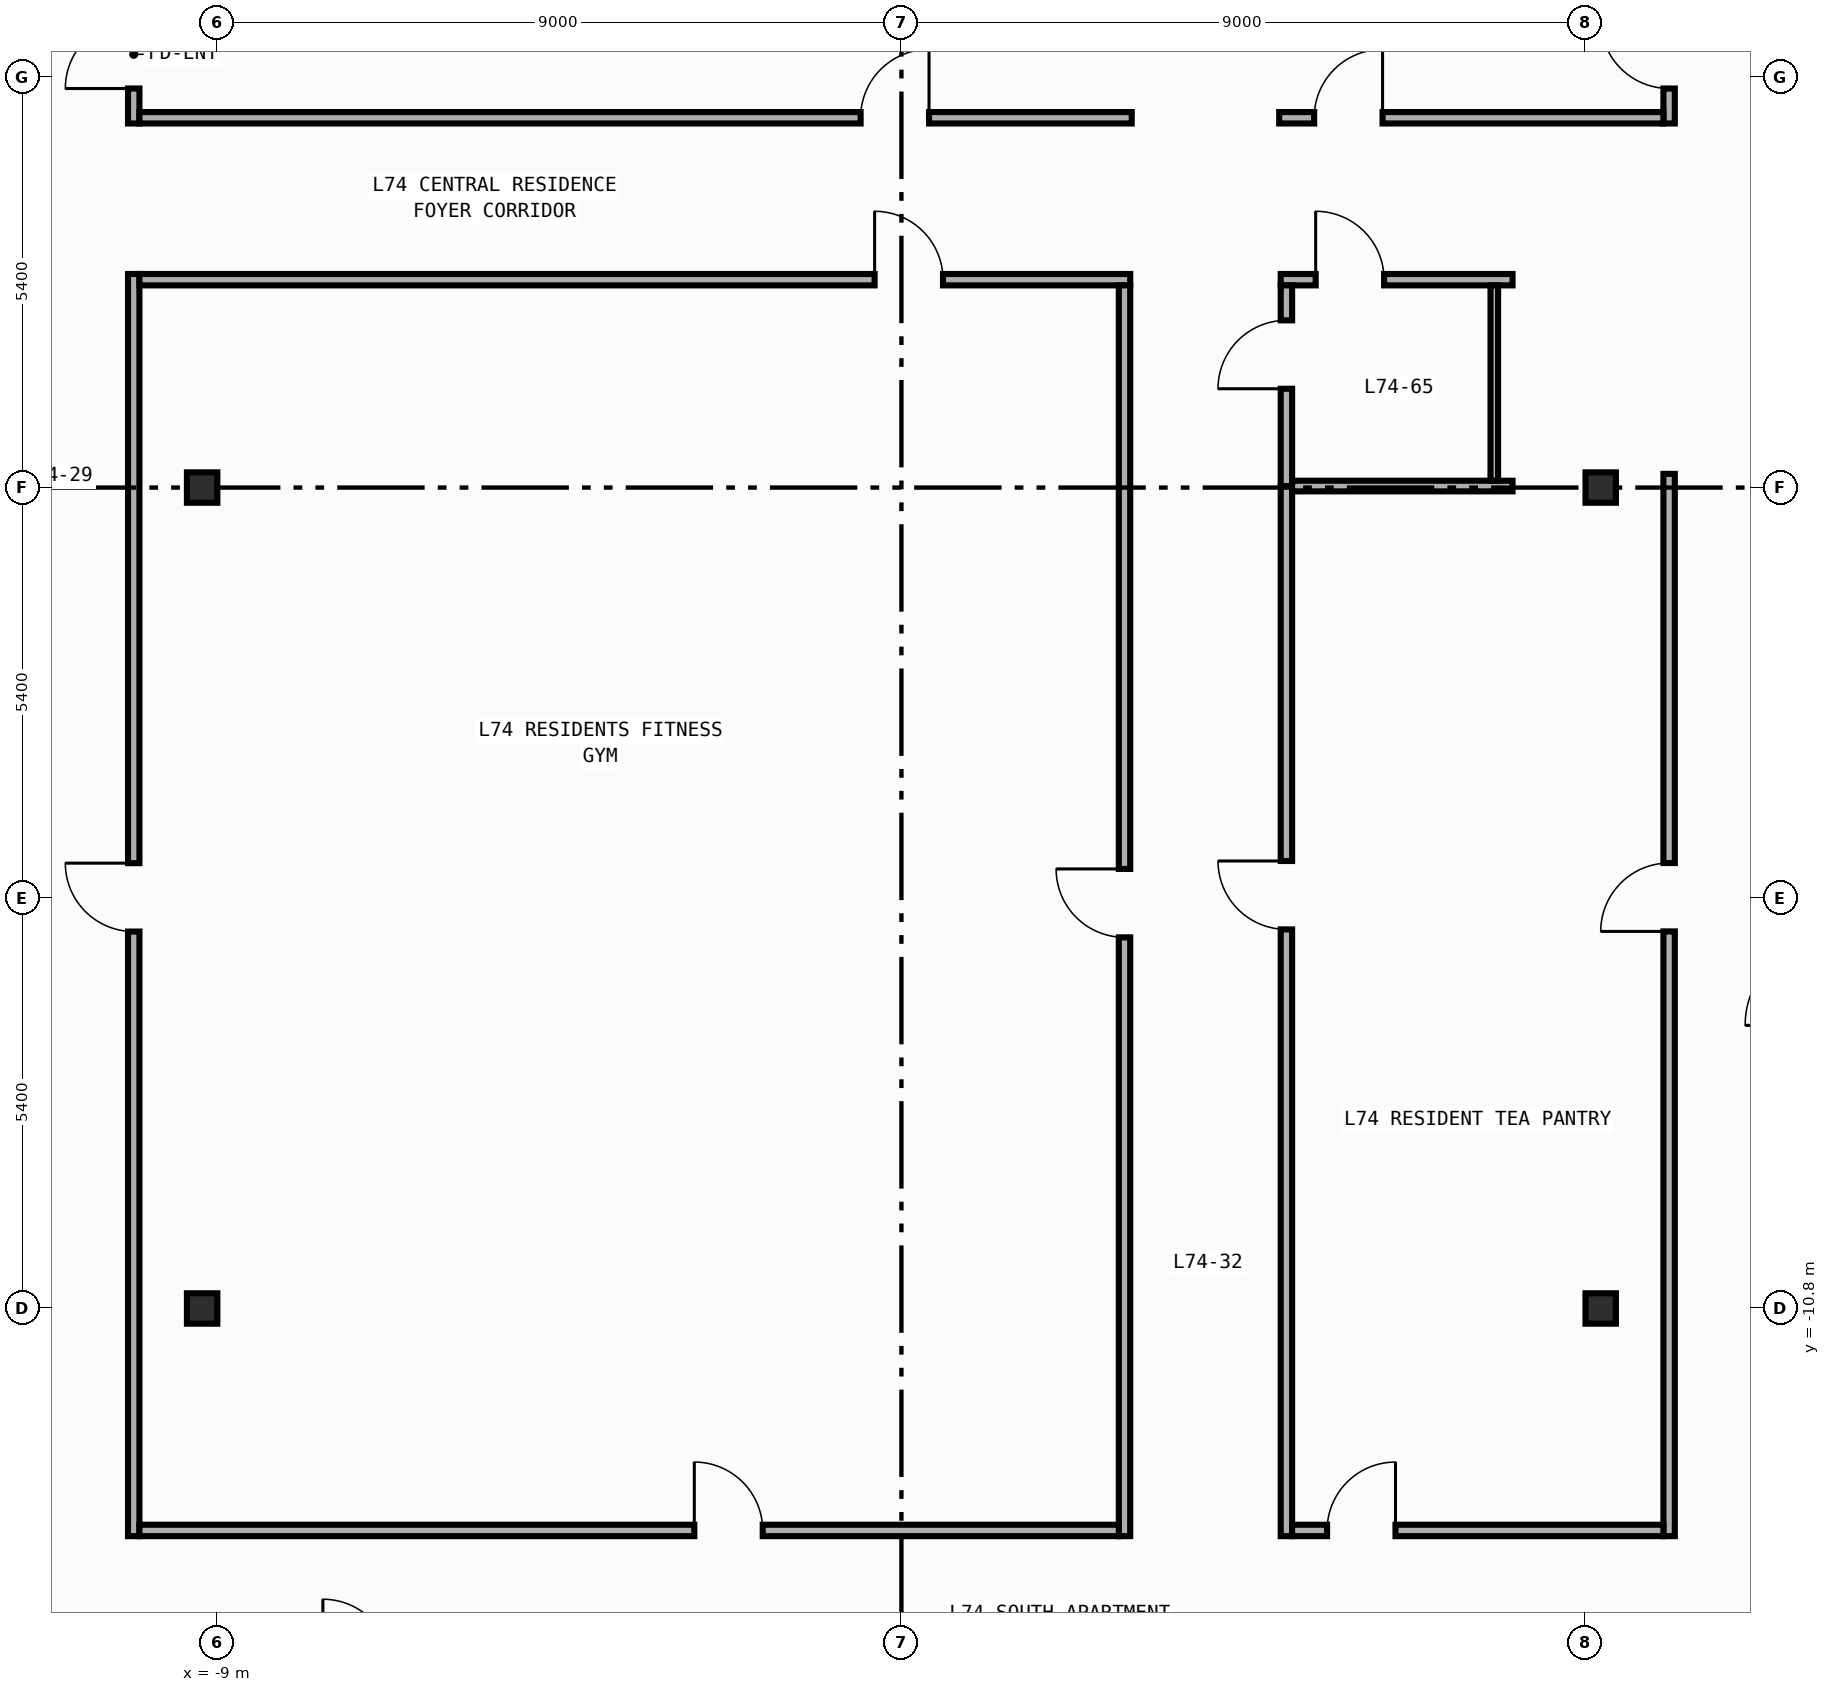
"""IFC4 building model, lengths in metres.
Left out: names, types, materials, properties, quantities, classifications, styles, units other than length and angle.
Written with IfcOpenShell. Run it as: python <this file> out.ifc"""

import sys

from ifc_helpers import new_model, si_unit, direction, frame, frame_2d, origin, origin_2d, place, context, subcontext, project, spatial, rectangle, i_section, extrude, element, fill, save


model = new_model("IFC4")
c1 = context("Model", 3, precision=1e-05, world=origin(), true_north=direction((0.0, 1.0)))
c2 = subcontext(c1, "Body", "Model", "MODEL_VIEW")
j1 = project(units=[si_unit("LENGTHUNIT", "METRE"), si_unit("PLANEANGLEUNIT", "RADIAN")], contexts=[c1])
p1 = place(None, origin())
s1 = spatial("IfcSite", under=j1, at=p1, CompositionType="ELEMENT")
p2 = place(p1, origin())
s2 = spatial("IfcBuilding", under=s1, at=p2, CompositionType="ELEMENT")
p3 = place(p2, frame((0.0, 0.0, 308.0)))
s3 = spatial("IfcBuildingStorey", under=s2, at=p3, CompositionType="ELEMENT", Elevation=308.0)
for number, where, z_axis, x_axis in (
    (1, (-9.2, -10.8, 0.0), (0.0, 0.0, 1.0), (1.0, 0.0, 0.0)),
    (2, (-9.2, 0.0, 0.0), (0.0, 0.0, 1.0), (1.0, 0.0, 0.0)),
    (3, (9.2, -10.8, 0.0), (0.0, 0.0, 1.0), (1.0, 0.0, 0.0)),
    (4, (9.2, 0.0, 0.0), (0.0, 0.0, 1.0), (1.0, 0.0, 0.0)),
):
    element("IfcColumn", number, at=place(p3, frame(where, z_axis=z_axis, x_axis=x_axis)), inside=s3, PredefinedType="COLUMN", context=c2, shape_type="SweptSolid", body=[
        extrude(i_section(OverallWidth=0.4, OverallDepth=0.4, WebThickness=0.013, FlangeThickness=0.021, FilletRadius=0.022, at=origin_2d()), origin(), (0.0, 0.0, 1.0), 3.8),
    ])
p4 = place(p3, frame((-10.1, 4.79, 0.0), z_axis=(0.0, 0.0, 1.0), x_axis=(0.0, 1.0, 0.0)))
e5 = element("IfcWall", 5, at=p4, inside=s3, PredefinedType="PARTITIONING", context=c2, shape_type="SweptSolid", body=[
    extrude(rectangle(XDim=9.005, YDim=0.15, at=frame_2d((4.502, 0.0))), origin(), (0.0, 0.0, 1.0), 3.54),
])
p5 = place(p4, frame((0.46, 0.0, 0.0)))
e6 = element("IfcOpeningElement", 6, at=p5, cuts=e5, PredefinedType="OPENING", context=c2, shape_type="SweptSolid", body=[
    extrude(rectangle(XDim=0.9, YDim=2.15, at=frame_2d((0.45, 1.075))), frame((0.0, 0.085, 0.0), z_axis=(0.0, -1.0, 0.0), x_axis=(1.0, 0.0, 0.0)), (0.0, 0.0, 1.0), 0.17),
])
p6 = place(p3, frame((-10.1, -13.795, 0.0), z_axis=(0.0, 0.0, 1.0), x_axis=(0.0, 1.0, 0.0)))
e7 = element("IfcWall", 7, at=p6, inside=s3, PredefinedType="PARTITIONING", context=c2, shape_type="SweptSolid", body=[
    extrude(rectangle(XDim=16.605, YDim=0.15, at=frame_2d((8.302, 0.0))), origin(), (0.0, 0.0, 1.0), 3.54),
])
p7 = place(p6, frame((7.954, 0.0, 0.0)))
e8 = element("IfcOpeningElement", 8, at=p7, cuts=e7, PredefinedType="OPENING", context=c2, shape_type="SweptSolid", body=[
    extrude(rectangle(XDim=0.9, YDim=2.15, at=frame_2d((0.45, 1.075))), frame((0.0, 0.085, 0.0), z_axis=(0.0, -1.0, 0.0), x_axis=(1.0, 0.0, 0.0)), (0.0, 0.0, 1.0), 0.17),
])
p8 = place(p3, frame((10.1, 4.79, 0.0), z_axis=(0.0, 0.0, 1.0), x_axis=(0.0, 1.0, 0.0)))
e9 = element("IfcWall", 9, at=p8, inside=s3, PredefinedType="PARTITIONING", context=c2, shape_type="SweptSolid", body=[
    extrude(rectangle(XDim=9.09, YDim=0.15, at=frame_2d((4.545, 0.0))), origin(), (0.0, 0.0, 1.0), 3.54),
])
p9 = place(p8, frame((0.46, 0.0, 0.0)))
e10 = element("IfcOpeningElement", 10, at=p9, cuts=e9, PredefinedType="OPENING", context=c2, shape_type="SweptSolid", body=[
    extrude(rectangle(XDim=0.9, YDim=2.15, at=frame_2d((0.45, 1.075))), frame((0.0, 0.085, 0.0), z_axis=(0.0, -1.0, 0.0), x_axis=(1.0, 0.0, 0.0)), (0.0, 0.0, 1.0), 0.17),
])
p10 = place(p3, frame((10.1, -13.795, 0.0), z_axis=(0.0, 0.0, 1.0), x_axis=(0.0, 1.0, 0.0)))
e11 = element("IfcWall", 11, at=p10, inside=s3, PredefinedType="PARTITIONING", context=c2, shape_type="SweptSolid", body=[
    extrude(rectangle(XDim=13.975, YDim=0.15, at=frame_2d((6.987, 0.0))), origin(), (0.0, 0.0, 1.0), 3.54),
])
p11 = place(p10, frame((7.956, 0.0, 0.0)))
e12 = element("IfcOpeningElement", 12, at=p11, cuts=e11, PredefinedType="OPENING", context=c2, shape_type="SweptSolid", body=[
    extrude(rectangle(XDim=0.9, YDim=2.15, at=frame_2d((0.45, 1.075))), frame((0.0, 0.085, 0.0), z_axis=(0.0, -1.0, 0.0), x_axis=(1.0, 0.0, 0.0)), (0.0, 0.0, 1.0), 0.17),
])
p12 = place(p3, frame((-10.025, 4.865, 0.0), z_axis=(0.0, 0.0, 1.0), x_axis=(1.0, 0.0, 0.0)))
e13 = element("IfcWall", 13, at=p12, inside=s3, PredefinedType="PARTITIONING", context=c2, shape_type="SweptSolid", body=[
    extrude(rectangle(XDim=13.055, YDim=0.15, at=frame_2d((6.527, 0.0))), origin(), (0.0, 0.0, 1.0), 3.54),
])
p13 = place(p12, frame((9.488, 0.0, 0.0)))
e14 = element("IfcOpeningElement", 14, at=p13, cuts=e13, PredefinedType="OPENING", context=c2, shape_type="SweptSolid", body=[
    extrude(rectangle(XDim=0.9, YDim=2.15, at=frame_2d((0.45, 1.075))), frame((0.0, 0.085, 0.0), z_axis=(0.0, -1.0, 0.0), x_axis=(1.0, 0.0, 0.0)), (0.0, 0.0, 1.0), 0.17),
])
p14 = place(p3, frame((-10.025, 2.735, 0.0), z_axis=(0.0, 0.0, 1.0), x_axis=(1.0, 0.0, 0.0)))
e15 = element("IfcWall", 15, at=p14, inside=s3, PredefinedType="PARTITIONING", context=c2, shape_type="SweptSolid", body=[
    extrude(rectangle(XDim=13.035, YDim=0.15, at=frame_2d((6.518, 0.0))), origin(), (0.0, 0.0, 1.0), 3.54),
])
p15 = place(p14, frame((9.672, 0.0, 0.0)))
e16 = element("IfcOpeningElement", 16, at=p15, cuts=e15, PredefinedType="OPENING", context=c2, shape_type="SweptSolid", body=[
    extrude(rectangle(XDim=0.9, YDim=2.15, at=frame_2d((0.45, 1.075))), frame((0.0, 0.085, 0.0), z_axis=(0.0, -1.0, 0.0), x_axis=(1.0, 0.0, 0.0)), (0.0, 0.0, 1.0), 0.17),
])
p16 = place(p3, frame((4.97, 4.865, 0.0), z_axis=(0.0, 0.0, 1.0), x_axis=(1.0, 0.0, 0.0)))
e17 = element("IfcWall", 17, at=p16, inside=s3, PredefinedType="PARTITIONING", context=c2, shape_type="SweptSolid", body=[
    extrude(rectangle(XDim=5.055, YDim=0.15, at=frame_2d((2.527, 0.0))), origin(), (0.0, 0.0, 1.0), 3.54),
])
p17 = place(p16, frame((0.46, 0.0, 0.0)))
e18 = element("IfcOpeningElement", 18, at=p17, cuts=e17, PredefinedType="OPENING", context=c2, shape_type="SweptSolid", body=[
    extrude(rectangle(XDim=0.9, YDim=2.15, at=frame_2d((0.45, 1.075))), frame((0.0, 0.085, 0.0), z_axis=(0.0, -1.0, 0.0), x_axis=(1.0, 0.0, 0.0)), (0.0, 0.0, 1.0), 0.17),
])
p18 = place(p3, frame((4.99, 2.735, 0.0), z_axis=(0.0, 0.0, 1.0), x_axis=(1.0, 0.0, 0.0)))
e19 = element("IfcWall", 19, at=p18, inside=s3, PredefinedType="PARTITIONING", context=c2, shape_type="SweptSolid", body=[
    extrude(rectangle(XDim=3.05, YDim=0.15, at=frame_2d((1.525, 0.0))), origin(), (0.0, 0.0, 1.0), 3.54),
])
p19 = place(p18, frame((0.46, 0.0, 0.0)))
e20 = element("IfcOpeningElement", 20, at=p19, cuts=e19, PredefinedType="OPENING", context=c2, shape_type="SweptSolid", body=[
    extrude(rectangle(XDim=0.9, YDim=2.15, at=frame_2d((0.45, 1.075))), frame((0.0, 0.085, 0.0), z_axis=(0.0, -1.0, 0.0), x_axis=(1.0, 0.0, 0.0)), (0.0, 0.0, 1.0), 0.17),
])
p20 = place(p3, frame((2.935, -13.795, 0.0), z_axis=(0.0, 0.0, 1.0), x_axis=(0.0, 1.0, 0.0)))
e21 = element("IfcWall", 21, at=p20, inside=s3, PredefinedType="PARTITIONING", context=c2, shape_type="SweptSolid", body=[
    extrude(rectangle(XDim=16.455, YDim=0.15, at=frame_2d((8.228, 0.0))), origin(), (0.0, 0.0, 1.0), 3.54),
])
p21 = place(p20, frame((7.878, 0.0, 0.0)))
e22 = element("IfcOpeningElement", 22, at=p21, cuts=e21, PredefinedType="OPENING", context=c2, shape_type="SweptSolid", body=[
    extrude(rectangle(XDim=0.9, YDim=2.15, at=frame_2d((0.45, 1.075))), frame((0.0, 0.085, 0.0), z_axis=(0.0, -1.0, 0.0), x_axis=(1.0, 0.0, 0.0)), (0.0, 0.0, 1.0), 0.17),
])
p22 = place(p3, frame((5.065, 0.02, 0.0), z_axis=(0.0, 0.0, 1.0), x_axis=(0.0, 1.0, 0.0)))
e23 = element("IfcWall", 23, at=p22, inside=s3, PredefinedType="PARTITIONING", context=c2, shape_type="SweptSolid", body=[
    extrude(rectangle(XDim=2.64, YDim=0.15, at=frame_2d((1.32, 0.0))), origin(), (0.0, 0.0, 1.0), 3.19),
])
p23 = place(p22, frame((1.28, 0.0, 0.0)))
e24 = element("IfcOpeningElement", 24, at=p23, cuts=e23, PredefinedType="OPENING", context=c2, shape_type="SweptSolid", body=[
    extrude(rectangle(XDim=0.9, YDim=2.15, at=frame_2d((0.45, 1.075))), frame((0.0, 0.085, 0.0), z_axis=(0.0, -1.0, 0.0), x_axis=(1.0, 0.0, 0.0)), (0.0, 0.0, 1.0), 0.17),
])
p24 = place(p3, frame((5.065, -13.795, 0.0), z_axis=(0.0, 0.0, 1.0), x_axis=(0.0, 1.0, 0.0)))
e25 = element("IfcWall", 25, at=p24, inside=s3, PredefinedType="PARTITIONING", context=c2, shape_type="SweptSolid", body=[
    extrude(rectangle(XDim=13.815, YDim=0.15, at=frame_2d((6.907, 0.0))), origin(), (0.0, 0.0, 1.0), 3.19),
])
p25 = place(p24, frame((7.982, 0.0, 0.0)))
e26 = element("IfcOpeningElement", 26, at=p25, cuts=e25, PredefinedType="OPENING", context=c2, shape_type="SweptSolid", body=[
    extrude(rectangle(XDim=0.9, YDim=2.15, at=frame_2d((0.45, 1.075))), frame((0.0, 0.085, 0.0), z_axis=(0.0, -1.0, 0.0), x_axis=(1.0, 0.0, 0.0)), (0.0, 0.0, 1.0), 0.17),
])
p26 = place(p3, frame((-10.025, -13.72, 0.0), z_axis=(0.0, 0.0, 1.0), x_axis=(1.0, 0.0, 0.0)))
e27 = element("IfcWall", 27, at=p26, inside=s3, PredefinedType="PARTITIONING", context=c2, shape_type="SweptSolid", body=[
    extrude(rectangle(XDim=12.885, YDim=0.15, at=frame_2d((6.442, 0.0))), origin(), (0.0, 0.0, 1.0), 3.54),
])
p27 = place(p26, frame((7.3, 0.0, 0.0)))
e28 = element("IfcOpeningElement", 28, at=p27, cuts=e27, PredefinedType="OPENING", context=c2, shape_type="SweptSolid", body=[
    extrude(rectangle(XDim=0.9, YDim=2.15, at=frame_2d((0.45, 1.075))), frame((0.0, 0.085, 0.0), z_axis=(0.0, -1.0, 0.0), x_axis=(1.0, 0.0, 0.0)), (0.0, 0.0, 1.0), 0.17),
])
p28 = place(p3, frame((5.14, -13.72, 0.0), z_axis=(0.0, 0.0, 1.0), x_axis=(1.0, 0.0, 0.0)))
e29 = element("IfcWall", 29, at=p28, inside=s3, PredefinedType="PARTITIONING", context=c2, shape_type="SweptSolid", body=[
    extrude(rectangle(XDim=4.885, YDim=0.15, at=frame_2d((2.442, 0.0))), origin(), (0.0, 0.0, 1.0), 3.54),
])
p29 = place(p28, frame((0.46, 0.0, 0.0)))
e30 = element("IfcOpeningElement", 30, at=p29, cuts=e29, PredefinedType="OPENING", context=c2, shape_type="SweptSolid", body=[
    extrude(rectangle(XDim=0.9, YDim=2.15, at=frame_2d((0.45, 1.075))), frame((0.0, 0.085, 0.0), z_axis=(0.0, -1.0, 0.0), x_axis=(1.0, 0.0, 0.0)), (0.0, 0.0, 1.0), 0.17),
])
p30 = place(p3, frame((5.14, 0.02, 0.0), z_axis=(0.0, 0.0, 1.0), x_axis=(1.0, 0.0, 0.0)))
e31 = element("IfcWall", 31, at=p30, inside=s3, PredefinedType="PARTITIONING", context=c2, shape_type="SweptSolid", body=[
    extrude(rectangle(XDim=2.9, YDim=0.14, at=frame_2d((1.45, 0.0))), origin(), (0.0, 0.0, 1.0), 2.64),
])
p31 = place(p3, frame((7.8, 2.66, 0.0), z_axis=(0.0, 0.0, 1.0), x_axis=(0.0, -1.0, 0.0)))
e32 = element("IfcWall", 32, at=p31, inside=s3, PredefinedType="PARTITIONING", context=c2, shape_type="SweptSolid", body=[
    extrude(rectangle(XDim=2.57, YDim=0.1, at=frame_2d((1.285, 0.0))), origin(), (0.0, 0.0, 1.0), 3.54),
])
p32 = place(p5, origin())
e33 = element("IfcDoor", 33, at=p32, inside=s3, OperationType="SINGLE_SWING_LEFT", PredefinedType="DOOR", context=c2, shape_type="SweptSolid", body=[
    extrude(rectangle(XDim=0.9, YDim=2.15, at=frame_2d((0.45, 1.075))), frame((0.0, 0.025, 0.0), z_axis=(0.0, -1.0, 0.0), x_axis=(1.0, 0.0, 0.0)), (0.0, 0.0, 1.0), 0.05),
])
fill(e6, e33)
p33 = place(p7, origin())
e34 = element("IfcDoor", 34, at=p33, inside=s3, OperationType="SINGLE_SWING_RIGHT", PredefinedType="DOOR", context=c2, shape_type="SweptSolid", body=[
    extrude(rectangle(XDim=0.9, YDim=2.15, at=frame_2d((0.45, 1.075))), frame((0.0, 0.025, 0.0), z_axis=(0.0, -1.0, 0.0), x_axis=(1.0, 0.0, 0.0)), (0.0, 0.0, 1.0), 0.05),
])
fill(e8, e34)
p34 = place(p9, origin())
e35 = element("IfcDoor", 35, at=p34, inside=s3, OperationType="SINGLE_SWING_RIGHT", PredefinedType="DOOR", context=c2, shape_type="SweptSolid", body=[
    extrude(rectangle(XDim=0.9, YDim=2.15, at=frame_2d((0.45, 1.075))), frame((0.0, 0.025, 0.0), z_axis=(0.0, -1.0, 0.0), x_axis=(1.0, 0.0, 0.0)), (0.0, 0.0, 1.0), 0.05),
])
fill(e10, e35)
p35 = place(p11, origin())
e36 = element("IfcDoor", 36, at=p35, inside=s3, OperationType="SINGLE_SWING_LEFT", PredefinedType="DOOR", context=c2, shape_type="SweptSolid", body=[
    extrude(rectangle(XDim=0.9, YDim=2.15, at=frame_2d((0.45, 1.075))), frame((0.0, 0.025, 0.0), z_axis=(0.0, -1.0, 0.0), x_axis=(1.0, 0.0, 0.0)), (0.0, 0.0, 1.0), 0.05),
])
fill(e12, e36)
p36 = place(p13, origin())
e37 = element("IfcDoor", 37, at=p36, inside=s3, OperationType="SINGLE_SWING_RIGHT", PredefinedType="DOOR", context=c2, shape_type="SweptSolid", body=[
    extrude(rectangle(XDim=0.9, YDim=2.15, at=frame_2d((0.45, 1.075))), frame((0.0, 0.025, 0.0), z_axis=(0.0, -1.0, 0.0), x_axis=(1.0, 0.0, 0.0)), (0.0, 0.0, 1.0), 0.05),
])
fill(e14, e37)
p37 = place(p15, origin())
e38 = element("IfcDoor", 38, at=p37, inside=s3, OperationType="SINGLE_SWING_LEFT", PredefinedType="DOOR", context=c2, shape_type="SweptSolid", body=[
    extrude(rectangle(XDim=0.9, YDim=2.15, at=frame_2d((0.45, 1.075))), frame((0.0, 0.025, 0.0), z_axis=(0.0, -1.0, 0.0), x_axis=(1.0, 0.0, 0.0)), (0.0, 0.0, 1.0), 0.05),
])
fill(e16, e38)
p38 = place(p17, origin())
e39 = element("IfcDoor", 39, at=p38, inside=s3, OperationType="SINGLE_SWING_RIGHT", PredefinedType="DOOR", context=c2, shape_type="SweptSolid", body=[
    extrude(rectangle(XDim=0.9, YDim=2.15, at=frame_2d((0.45, 1.075))), frame((0.0, 0.025, 0.0), z_axis=(0.0, -1.0, 0.0), x_axis=(1.0, 0.0, 0.0)), (0.0, 0.0, 1.0), 0.05),
])
fill(e18, e39)
p39 = place(p19, origin())
e40 = element("IfcDoor", 40, at=p39, inside=s3, OperationType="SINGLE_SWING_LEFT", PredefinedType="DOOR", context=c2, shape_type="SweptSolid", body=[
    extrude(rectangle(XDim=0.9, YDim=2.15, at=frame_2d((0.45, 1.075))), frame((0.0, 0.025, 0.0), z_axis=(0.0, -1.0, 0.0), x_axis=(1.0, 0.0, 0.0)), (0.0, 0.0, 1.0), 0.05),
])
fill(e20, e40)
p40 = place(p21, origin())
e41 = element("IfcDoor", 41, at=p40, inside=s3, OperationType="SINGLE_SWING_RIGHT", PredefinedType="DOOR", context=c2, shape_type="SweptSolid", body=[
    extrude(rectangle(XDim=0.9, YDim=2.15, at=frame_2d((0.45, 1.075))), frame((0.0, 0.025, 0.0), z_axis=(0.0, -1.0, 0.0), x_axis=(1.0, 0.0, 0.0)), (0.0, 0.0, 1.0), 0.05),
])
fill(e22, e41)
p41 = place(p23, origin())
e42 = element("IfcDoor", 42, at=p41, inside=s3, OperationType="SINGLE_SWING_LEFT", PredefinedType="DOOR", context=c2, shape_type="SweptSolid", body=[
    extrude(rectangle(XDim=0.9, YDim=2.15, at=frame_2d((0.45, 1.075))), frame((0.0, 0.025, 0.0), z_axis=(0.0, -1.0, 0.0), x_axis=(1.0, 0.0, 0.0)), (0.0, 0.0, 1.0), 0.05),
])
fill(e24, e42)
p42 = place(p25, origin())
e43 = element("IfcDoor", 43, at=p42, inside=s3, OperationType="SINGLE_SWING_RIGHT", PredefinedType="DOOR", context=c2, shape_type="SweptSolid", body=[
    extrude(rectangle(XDim=0.9, YDim=2.15, at=frame_2d((0.45, 1.075))), frame((0.0, 0.025, 0.0), z_axis=(0.0, -1.0, 0.0), x_axis=(1.0, 0.0, 0.0)), (0.0, 0.0, 1.0), 0.05),
])
fill(e26, e43)
p43 = place(p27, origin())
e44 = element("IfcDoor", 44, at=p43, inside=s3, OperationType="SINGLE_SWING_LEFT", PredefinedType="DOOR", context=c2, shape_type="SweptSolid", body=[
    extrude(rectangle(XDim=0.9, YDim=2.15, at=frame_2d((0.45, 1.075))), frame((0.0, 0.025, 0.0), z_axis=(0.0, -1.0, 0.0), x_axis=(1.0, 0.0, 0.0)), (0.0, 0.0, 1.0), 0.05),
])
fill(e28, e44)
p44 = place(p29, origin())
e45 = element("IfcDoor", 45, at=p44, inside=s3, OperationType="SINGLE_SWING_RIGHT", PredefinedType="DOOR", context=c2, shape_type="SweptSolid", body=[
    extrude(rectangle(XDim=0.9, YDim=2.15, at=frame_2d((0.45, 1.075))), frame((0.0, 0.025, 0.0), z_axis=(0.0, -1.0, 0.0), x_axis=(1.0, 0.0, 0.0)), (0.0, 0.0, 1.0), 0.05),
])
fill(e30, e45)
save(model, sys.argv[1])
